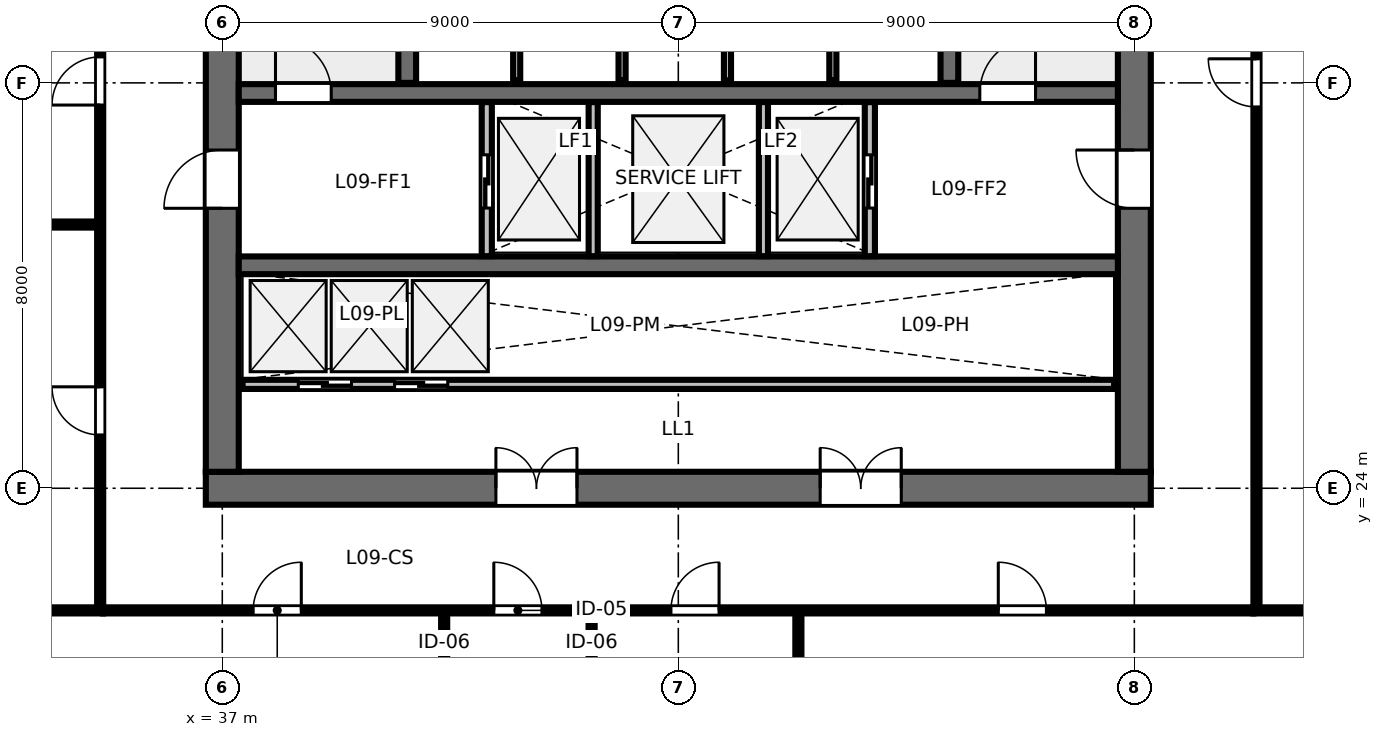
"""IFC4 building model, lengths in metres.
Left out: names, types, materials, properties, quantities, classifications, styles, units other than length and angle.
Written with IfcOpenShell. Run it as: python <this file> out.ifc"""

import sys

from ifc_helpers import new_model, si_unit, direction, frame, frame_2d, origin, place, context, subcontext, project, spatial, rectangle, extrude, element, fill, save


model = new_model("IFC4")
c1 = context("Model", 3, precision=1e-05, world=origin(), true_north=direction((0.0, 1.0)))
c2 = subcontext(c1, "Body", "Model", "MODEL_VIEW")
j1 = project(units=[si_unit("LENGTHUNIT", "METRE"), si_unit("PLANEANGLEUNIT", "RADIAN")], contexts=[c1])
p1 = place(None, origin())
s1 = spatial("IfcSite", under=j1, at=p1, CompositionType="ELEMENT")
p2 = place(p1, origin())
s2 = spatial("IfcBuilding", under=s1, at=p2, CompositionType="ELEMENT")
p3 = place(p2, frame((0.0, 0.0, 38.8)))
s3 = spatial("IfcBuildingStorey", under=s2, at=p3, CompositionType="ELEMENT", Elevation=38.8)
p4 = place(p3, frame((36.675, 24.0, 0.0), z_axis=(0.0, 0.0, 1.0), x_axis=(1.0, 0.0, 0.0)))
e1 = element("IfcWall", 1, at=p4, inside=s3, PredefinedType="SHEAR", context=c2, shape_type="SweptSolid", body=[
    extrude(rectangle(XDim=18.65, YDim=0.65, at=frame_2d((9.325, 0.0))), origin(), (0.0, 0.0, 1.0), 3.36),
])
p5 = place(p4, frame((5.725, 0.0, 0.0)))
e2 = element("IfcOpeningElement", 2, at=p5, cuts=e1, PredefinedType="OPENING", context=c2, shape_type="SweptSolid", body=[
    extrude(rectangle(XDim=1.6, YDim=2.15, at=frame_2d((0.8, 1.075))), frame((0.0, 0.335, 0.0), z_axis=(0.0, -1.0, 0.0), x_axis=(1.0, 0.0, 0.0)), (0.0, 0.0, 1.0), 0.67),
])
p6 = place(p4, frame((12.125, 0.0, 0.0)))
e3 = element("IfcOpeningElement", 3, at=p6, cuts=e1, PredefinedType="OPENING", context=c2, shape_type="SweptSolid", body=[
    extrude(rectangle(XDim=1.6, YDim=2.15, at=frame_2d((0.8, 1.075))), frame((0.0, 0.335, 0.0), z_axis=(0.0, -1.0, 0.0), x_axis=(1.0, 0.0, 0.0)), (0.0, 0.0, 1.0), 0.67),
])
p7 = place(p3, frame((37.0, 24.325, 0.0), z_axis=(0.0, 0.0, 1.0), x_axis=(0.0, 1.0, 0.0)))
e4 = element("IfcWall", 4, at=p7, inside=s3, PredefinedType="SHEAR", context=c2, shape_type="SweptSolid", body=[
    extrude(rectangle(XDim=15.35, YDim=0.65, at=frame_2d((7.675, 0.0))), origin(), (0.0, 0.0, 1.0), 3.36),
])
p8 = place(p7, frame((5.2, 0.0, 0.0)))
e5 = element("IfcOpeningElement", 5, at=p8, cuts=e4, PredefinedType="OPENING", context=c2, shape_type="SweptSolid", body=[
    extrude(rectangle(XDim=1.15, YDim=2.15, at=frame_2d((0.575, 1.075))), frame((0.0, 0.335, 0.0), z_axis=(0.0, -1.0, 0.0), x_axis=(1.0, 0.0, 0.0)), (0.0, 0.0, 1.0), 0.67),
])
p9 = place(p3, frame((55.0, 24.325, 0.0), z_axis=(0.0, 0.0, 1.0), x_axis=(0.0, 1.0, 0.0)))
e6 = element("IfcWall", 6, at=p9, inside=s3, PredefinedType="SHEAR", context=c2, shape_type="SweptSolid", body=[
    extrude(rectangle(XDim=15.35, YDim=0.65, at=frame_2d((7.675, 0.0))), origin(), (0.0, 0.0, 1.0), 3.36),
])
p10 = place(p9, frame((5.2, 0.0, 0.0)))
e7 = element("IfcOpeningElement", 7, at=p10, cuts=e6, PredefinedType="OPENING", context=c2, shape_type="SweptSolid", body=[
    extrude(rectangle(XDim=1.15, YDim=2.15, at=frame_2d((0.575, 1.075))), frame((0.0, 0.335, 0.0), z_axis=(0.0, -1.0, 0.0), x_axis=(1.0, 0.0, 0.0)), (0.0, 0.0, 1.0), 0.67),
])
p11 = place(p3, frame((37.325, 31.8, 0.0), z_axis=(0.0, 0.0, 1.0), x_axis=(1.0, 0.0, 0.0)))
e8 = element("IfcWall", 8, at=p11, inside=s3, PredefinedType="SHEAR", context=c2, shape_type="SweptSolid", body=[
    extrude(rectangle(XDim=17.35, YDim=0.35, at=frame_2d((8.675, 0.0))), origin(), (0.0, 0.0, 1.0), 3.36),
])
p12 = place(p11, frame((0.725, 0.0, 0.0)))
e9 = element("IfcOpeningElement", 9, at=p12, cuts=e8, PredefinedType="OPENING", context=c2, shape_type="SweptSolid", body=[
    extrude(rectangle(XDim=1.1, YDim=2.15, at=frame_2d((0.55, 1.075))), frame((0.0, 0.185, 0.0), z_axis=(0.0, -1.0, 0.0), x_axis=(1.0, 0.0, 0.0)), (0.0, 0.0, 1.0), 0.37),
])
p13 = place(p11, frame((14.625, 0.0, 0.0)))
e10 = element("IfcOpeningElement", 10, at=p13, cuts=e8, PredefinedType="OPENING", context=c2, shape_type="SweptSolid", body=[
    extrude(rectangle(XDim=1.1, YDim=2.15, at=frame_2d((0.55, 1.075))), frame((0.0, 0.185, 0.0), z_axis=(0.0, -1.0, 0.0), x_axis=(1.0, 0.0, 0.0)), (0.0, 0.0, 1.0), 0.37),
])
p14 = place(p3, frame((37.325, 28.4, 0.0), z_axis=(0.0, 0.0, 1.0), x_axis=(1.0, 0.0, 0.0)))
e11 = element("IfcWall", 11, at=p14, inside=s3, PredefinedType="SHEAR", context=c2, shape_type="SweptSolid", body=[
    extrude(rectangle(XDim=17.35, YDim=0.35, at=frame_2d((8.675, 0.0))), origin(), (0.0, 0.0, 1.0), 3.36),
])
for number, where, z_axis, x_axis in (
    (12, (40.65, 32.0, 0.0), (0.0, 0.0, 1.0), (0.0, 1.0, 0.0)),
    (13, (51.35, 32.0, 0.0), (0.0, 0.0, 1.0), (0.0, 1.0, 0.0)),
):
    element("IfcWall", number, at=place(p3, frame(where, z_axis=z_axis, x_axis=x_axis)), inside=s3, PredefinedType="SHEAR", context=c2, shape_type="SweptSolid", body=[
        extrude(rectangle(XDim=7.7, YDim=0.35, at=frame_2d((3.85, 0.0))), origin(), (0.0, 0.0, 1.0), 3.6),
    ])
for number, where, z_axis, x_axis in (
    (14, (42.81, 32.05, 0.0), (0.0, 0.0, 1.0), (0.0, 1.0, 0.0)),
    (15, (44.89, 32.05, 0.0), (0.0, 0.0, 1.0), (0.0, 1.0, 0.0)),
    (16, (46.97, 32.05, 0.0), (0.0, 0.0, 1.0), (0.0, 1.0, 0.0)),
    (17, (49.05, 32.05, 0.0), (0.0, 0.0, 1.0), (0.0, 1.0, 0.0)),
):
    element("IfcWall", number, at=place(p3, frame(where, z_axis=z_axis, x_axis=x_axis)), inside=s3, PredefinedType="PARTITIONING", context=c2, shape_type="SweptSolid", body=[
        extrude(rectangle(XDim=5.5, YDim=0.14, at=frame_2d((2.75, 0.0))), origin(), (0.0, 0.0, 1.0), 3.36),
    ])
p15 = place(p3, frame((42.22, 28.58, 0.0), z_axis=(0.0, 0.0, 1.0), x_axis=(0.0, 1.0, 0.0)))
e18 = element("IfcWall", 18, at=p15, inside=s3, PredefinedType="PARTITIONING", context=c2, shape_type="SweptSolid", body=[
    extrude(rectangle(XDim=3.04, YDim=0.2, at=frame_2d((1.52, 0.0))), origin(), (0.0, 0.0, 1.0), 3.36),
])
p16 = place(p15, frame((0.95, 0.0, 0.0)))
e19 = element("IfcOpeningElement", 19, at=p16, cuts=e18, PredefinedType="OPENING", context=c2, shape_type="SweptSolid", body=[
    extrude(rectangle(XDim=1.05, YDim=2.15, at=frame_2d((0.525, 1.075))), frame((0.0, 0.11, 0.0), z_axis=(0.0, -1.0, 0.0), x_axis=(1.0, 0.0, 0.0)), (0.0, 0.0, 1.0), 0.22),
])
p17 = place(p3, frame((49.78, 28.58, 0.0), z_axis=(0.0, 0.0, 1.0), x_axis=(0.0, 1.0, 0.0)))
e20 = element("IfcWall", 20, at=p17, inside=s3, PredefinedType="PARTITIONING", context=c2, shape_type="SweptSolid", body=[
    extrude(rectangle(XDim=3.04, YDim=0.2, at=frame_2d((1.52, 0.0))), origin(), (0.0, 0.0, 1.0), 3.36),
])
p18 = place(p17, frame((0.95, 0.0, 0.0)))
e21 = element("IfcOpeningElement", 21, at=p18, cuts=e20, PredefinedType="OPENING", context=c2, shape_type="SweptSolid", body=[
    extrude(rectangle(XDim=1.05, YDim=2.15, at=frame_2d((0.525, 1.075))), frame((0.0, 0.11, 0.0), z_axis=(0.0, -1.0, 0.0), x_axis=(1.0, 0.0, 0.0)), (0.0, 0.0, 1.0), 0.22),
])
for number, where, z_axis, x_axis in (
    (22, (44.32, 28.58, 0.0), (0.0, 0.0, 1.0), (0.0, 1.0, 0.0)),
    (23, (47.68, 28.58, 0.0), (0.0, 0.0, 1.0), (0.0, 1.0, 0.0)),
):
    element("IfcWall", number, at=place(p3, frame(where, z_axis=z_axis, x_axis=x_axis)), inside=s3, PredefinedType="PARTITIONING", context=c2, shape_type="SweptSolid", body=[
        extrude(rectangle(XDim=3.04, YDim=0.18, at=frame_2d((1.52, 0.0))), origin(), (0.0, 0.0, 1.0), 3.36),
    ])
p19 = place(p3, frame((37.4, 26.05, 0.0), z_axis=(0.0, 0.0, 1.0), x_axis=(1.0, 0.0, 0.0)))
e24 = element("IfcWall", 24, at=p19, inside=s3, PredefinedType="PARTITIONING", context=c2, shape_type="SweptSolid", body=[
    extrude(rectangle(XDim=17.2, YDim=0.18, at=frame_2d((8.6, 0.0))), origin(), (0.0, 0.0, 1.0), 3.36),
])
p20 = place(p19, frame((1.1, 0.0, 0.0)))
e25 = element("IfcOpeningElement", 25, at=p20, cuts=e24, PredefinedType="OPENING", context=c2, shape_type="SweptSolid", body=[
    extrude(rectangle(XDim=1.05, YDim=2.15, at=frame_2d((0.525, 1.075))), frame((0.0, 0.1, 0.0), z_axis=(0.0, -1.0, 0.0), x_axis=(1.0, 0.0, 0.0)), (0.0, 0.0, 1.0), 0.2),
])
p21 = place(p19, frame((3.0, 0.0, 0.0)))
e26 = element("IfcOpeningElement", 26, at=p21, cuts=e24, PredefinedType="OPENING", context=c2, shape_type="SweptSolid", body=[
    extrude(rectangle(XDim=1.05, YDim=2.15, at=frame_2d((0.525, 1.075))), frame((0.0, 0.1, 0.0), z_axis=(0.0, -1.0, 0.0), x_axis=(1.0, 0.0, 0.0)), (0.0, 0.0, 1.0), 0.2),
])
p22 = place(p3, frame((41.379, 21.59, 0.0), z_axis=(0.0, 0.0, 1.0), x_axis=(0.0, -1.0, 0.0)))
e27 = element("IfcWall", 27, at=p22, inside=s3, PredefinedType="PARTITIONING", context=c2, shape_type="SweptSolid", body=[
    extrude(rectangle(XDim=10.51, YDim=0.12, at=frame_2d((5.255, 0.0))), origin(), (0.0, 0.0, 1.0), 2.64),
])
p23 = place(p22, frame((1.4, 0.0, 0.0)))
e28 = element("IfcOpeningElement", 28, at=p23, cuts=e27, PredefinedType="OPENING", context=c2, shape_type="SweptSolid", body=[
    extrude(rectangle(XDim=0.9, YDim=2.15, at=frame_2d((0.45, 1.075))), frame((0.0, 0.07, 0.0), z_axis=(0.0, -1.0, 0.0), x_axis=(1.0, 0.0, 0.0)), (0.0, 0.0, 1.0), 0.14),
])
p24 = place(p3, frame((44.289, 21.59, 0.0), z_axis=(0.0, 0.0, 1.0), x_axis=(0.0, -1.0, 0.0)))
e29 = element("IfcWall", 29, at=p24, inside=s3, PredefinedType="PARTITIONING", context=c2, shape_type="SweptSolid", body=[
    extrude(rectangle(XDim=10.51, YDim=0.12, at=frame_2d((5.255, 0.0))), origin(), (0.0, 0.0, 1.0), 2.64),
])
p25 = place(p24, frame((1.4, 0.0, 0.0)))
e30 = element("IfcOpeningElement", 30, at=p25, cuts=e29, PredefinedType="OPENING", context=c2, shape_type="SweptSolid", body=[
    extrude(rectangle(XDim=0.9, YDim=2.15, at=frame_2d((0.45, 1.075))), frame((0.0, 0.07, 0.0), z_axis=(0.0, -1.0, 0.0), x_axis=(1.0, 0.0, 0.0)), (0.0, 0.0, 1.0), 0.14),
])
p26 = place(p3, frame((48.37, 21.59, 0.0), z_axis=(0.0, 0.0, 1.0), x_axis=(0.0, -1.0, 0.0)))
e31 = element("IfcWall", 31, at=p26, inside=s3, PredefinedType="PARTITIONING", context=c2, shape_type="SweptSolid", body=[
    extrude(rectangle(XDim=10.51, YDim=0.12, at=frame_2d((5.255, 0.0))), origin(), (0.0, 0.0, 1.0), 2.64),
])
p27 = place(p26, frame((1.4, 0.0, 0.0)))
e32 = element("IfcOpeningElement", 32, at=p27, cuts=e31, PredefinedType="OPENING", context=c2, shape_type="SweptSolid", body=[
    extrude(rectangle(XDim=0.9, YDim=2.15, at=frame_2d((0.45, 1.075))), frame((0.0, 0.07, 0.0), z_axis=(0.0, -1.0, 0.0), x_axis=(1.0, 0.0, 0.0)), (0.0, 0.0, 1.0), 0.14),
])
p28 = place(p3, frame((34.65, 21.59, 0.0), z_axis=(0.0, 0.0, 1.0), x_axis=(1.0, 0.0, 0.0)))
e33 = element("IfcWall", 33, at=p28, inside=s3, PredefinedType="PARTITIONING", context=c2, shape_type="SweptSolid", body=[
    extrude(rectangle(XDim=22.7, YDim=0.12, at=frame_2d((11.35, 0.0))), origin(), (0.0, 0.0, 1.0), 2.64),
])
p29 = place(p28, frame((2.959, 0.0, 0.0)))
e34 = element("IfcOpeningElement", 34, at=p29, cuts=e33, PredefinedType="OPENING", context=c2, shape_type="SweptSolid", body=[
    extrude(rectangle(XDim=0.95, YDim=2.15, at=frame_2d((0.475, 1.075))), frame((0.0, 0.07, 0.0), z_axis=(0.0, -1.0, 0.0), x_axis=(1.0, 0.0, 0.0)), (0.0, 0.0, 1.0), 0.14),
])
p30 = place(p28, frame((7.709, 0.0, 0.0)))
e35 = element("IfcOpeningElement", 35, at=p30, cuts=e33, PredefinedType="OPENING", context=c2, shape_type="SweptSolid", body=[
    extrude(rectangle(XDim=0.95, YDim=2.15, at=frame_2d((0.475, 1.075))), frame((0.0, 0.07, 0.0), z_axis=(0.0, -1.0, 0.0), x_axis=(1.0, 0.0, 0.0)), (0.0, 0.0, 1.0), 0.14),
])
p31 = place(p28, frame((11.204, 0.0, 0.0)))
e36 = element("IfcOpeningElement", 36, at=p31, cuts=e33, PredefinedType="OPENING", context=c2, shape_type="SweptSolid", body=[
    extrude(rectangle(XDim=0.95, YDim=2.15, at=frame_2d((0.475, 1.075))), frame((0.0, 0.07, 0.0), z_axis=(0.0, -1.0, 0.0), x_axis=(1.0, 0.0, 0.0)), (0.0, 0.0, 1.0), 0.14),
])
p32 = place(p28, frame((17.665, 0.0, 0.0)))
e37 = element("IfcOpeningElement", 37, at=p32, cuts=e33, PredefinedType="OPENING", context=c2, shape_type="SweptSolid", body=[
    extrude(rectangle(XDim=0.95, YDim=2.15, at=frame_2d((0.475, 1.075))), frame((0.0, 0.07, 0.0), z_axis=(0.0, -1.0, 0.0), x_axis=(1.0, 0.0, 0.0)), (0.0, 0.0, 1.0), 0.14),
])
p33 = place(p3, frame((34.59, 29.204, 0.0), z_axis=(0.0, 0.0, 1.0), x_axis=(-1.0, 0.0, 0.0)))
e38 = element("IfcWall", 38, at=p33, inside=s3, PredefinedType="PARTITIONING", context=c2, shape_type="SweptSolid", body=[
    extrude(rectangle(XDim=12.36, YDim=0.12, at=frame_2d((6.18, 0.0))), origin(), (0.0, 0.0, 1.0), 2.64),
])
p34 = place(p33, frame((1.4, 0.0, 0.0)))
e39 = element("IfcOpeningElement", 39, at=p34, cuts=e38, PredefinedType="OPENING", context=c2, shape_type="SweptSolid", body=[
    extrude(rectangle(XDim=0.9, YDim=2.15, at=frame_2d((0.45, 1.075))), frame((0.0, 0.07, 0.0), z_axis=(0.0, -1.0, 0.0), x_axis=(1.0, 0.0, 0.0)), (0.0, 0.0, 1.0), 0.14),
])
p35 = place(p3, frame((34.59, 21.65, 0.0), z_axis=(0.0, 0.0, 1.0), x_axis=(0.0, 1.0, 0.0)))
e40 = element("IfcWall", 40, at=p35, inside=s3, PredefinedType="PARTITIONING", context=c2, shape_type="SweptSolid", body=[
    extrude(rectangle(XDim=20.7, YDim=0.12, at=frame_2d((10.35, 0.0))), origin(), (0.0, 0.0, 1.0), 2.64),
])
p36 = place(p35, frame((3.402, 0.0, 0.0)))
e41 = element("IfcOpeningElement", 41, at=p36, cuts=e40, PredefinedType="OPENING", context=c2, shape_type="SweptSolid", body=[
    extrude(rectangle(XDim=0.95, YDim=2.15, at=frame_2d((0.475, 1.075))), frame((0.0, 0.07, 0.0), z_axis=(0.0, -1.0, 0.0), x_axis=(1.0, 0.0, 0.0)), (0.0, 0.0, 1.0), 0.14),
])
p37 = place(p35, frame((9.912, 0.0, 0.0)))
e42 = element("IfcOpeningElement", 42, at=p37, cuts=e40, PredefinedType="OPENING", context=c2, shape_type="SweptSolid", body=[
    extrude(rectangle(XDim=0.95, YDim=2.15, at=frame_2d((0.475, 1.075))), frame((0.0, 0.07, 0.0), z_axis=(0.0, -1.0, 0.0), x_axis=(1.0, 0.0, 0.0)), (0.0, 0.0, 1.0), 0.14),
])
p38 = place(p35, frame((16.385, 0.0, 0.0)))
e43 = element("IfcOpeningElement", 43, at=p38, cuts=e40, PredefinedType="OPENING", context=c2, shape_type="SweptSolid", body=[
    extrude(rectangle(XDim=0.95, YDim=2.15, at=frame_2d((0.475, 1.075))), frame((0.0, 0.07, 0.0), z_axis=(0.0, -1.0, 0.0), x_axis=(1.0, 0.0, 0.0)), (0.0, 0.0, 1.0), 0.14),
])
p39 = place(p3, frame((57.41, 21.65, 0.0), z_axis=(0.0, 0.0, 1.0), x_axis=(0.0, 1.0, 0.0)))
e44 = element("IfcWall", 44, at=p39, inside=s3, PredefinedType="PARTITIONING", context=c2, shape_type="SweptSolid", body=[
    extrude(rectangle(XDim=20.7, YDim=0.12, at=frame_2d((10.35, 0.0))), origin(), (0.0, 0.0, 1.0), 2.64),
])
p40 = place(p39, frame((9.875, 0.0, 0.0)))
e45 = element("IfcOpeningElement", 45, at=p40, cuts=e44, PredefinedType="OPENING", context=c2, shape_type="SweptSolid", body=[
    extrude(rectangle(XDim=0.95, YDim=2.15, at=frame_2d((0.475, 1.075))), frame((0.0, 0.07, 0.0), z_axis=(0.0, -1.0, 0.0), x_axis=(1.0, 0.0, 0.0)), (0.0, 0.0, 1.0), 0.14),
])
for number, where, z_axis, x_axis in (
    (46, (34.65, 21.59, 0.0), (0.0, 0.0, 1.0), (-1.0, 0.0, 0.0)),
    (47, (57.35, 21.59, 0.0), (0.0, 0.0, 1.0), (1.0, 0.0, 0.0)),
):
    element("IfcWall", number, at=place(p3, frame(where, z_axis=z_axis, x_axis=x_axis)), inside=s3, PredefinedType="PARTITIONING", context=c2, shape_type="SweptSolid", body=[
        extrude(rectangle(XDim=12.42, YDim=0.12, at=frame_2d((6.21, 0.0))), origin(), (0.0, 0.0, 1.0), 2.64),
    ])
p41 = place(p12, origin())
e48 = element("IfcDoor", 48, at=p41, inside=s3, OperationType="SINGLE_SWING_LEFT", PredefinedType="DOOR", context=c2, shape_type="SweptSolid", body=[
    extrude(rectangle(XDim=1.1, YDim=2.15, at=frame_2d((0.55, 1.075))), frame((0.0, 0.025, 0.0), z_axis=(0.0, -1.0, 0.0), x_axis=(1.0, 0.0, 0.0)), (0.0, 0.0, 1.0), 0.05),
])
fill(e9, e48)
p42 = place(p13, origin())
e49 = element("IfcDoor", 49, at=p42, inside=s3, OperationType="SINGLE_SWING_RIGHT", PredefinedType="DOOR", context=c2, shape_type="SweptSolid", body=[
    extrude(rectangle(XDim=1.1, YDim=2.15, at=frame_2d((0.55, 1.075))), frame((0.0, 0.025, 0.0), z_axis=(0.0, -1.0, 0.0), x_axis=(1.0, 0.0, 0.0)), (0.0, 0.0, 1.0), 0.05),
])
fill(e10, e49)
p43 = place(p8, origin())
e50 = element("IfcDoor", 50, at=p43, inside=s3, OperationType="SINGLE_SWING_LEFT", PredefinedType="DOOR", context=c2, shape_type="SweptSolid", body=[
    extrude(rectangle(XDim=1.15, YDim=2.15, at=frame_2d((0.575, 1.075))), frame((0.0, 0.025, 0.0), z_axis=(0.0, -1.0, 0.0), x_axis=(1.0, 0.0, 0.0)), (0.0, 0.0, 1.0), 0.05),
])
fill(e5, e50)
p44 = place(p10, origin())
e51 = element("IfcDoor", 51, at=p44, inside=s3, OperationType="SINGLE_SWING_RIGHT", PredefinedType="DOOR", context=c2, shape_type="SweptSolid", body=[
    extrude(rectangle(XDim=1.15, YDim=2.15, at=frame_2d((0.575, 1.075))), frame((0.0, 0.025, 0.0), z_axis=(0.0, -1.0, 0.0), x_axis=(1.0, 0.0, 0.0)), (0.0, 0.0, 1.0), 0.05),
])
fill(e7, e51)
p45 = place(p5, origin())
e52 = element("IfcDoor", 52, at=p45, inside=s3, OperationType="DOUBLE_DOOR_SINGLE_SWING", PredefinedType="DOOR", context=c2, shape_type="SweptSolid", body=[
    extrude(rectangle(XDim=1.6, YDim=2.15, at=frame_2d((0.8, 1.075))), frame((0.0, 0.025, 0.0), z_axis=(0.0, -1.0, 0.0), x_axis=(1.0, 0.0, 0.0)), (0.0, 0.0, 1.0), 0.05),
])
fill(e2, e52)
p46 = place(p6, origin())
e53 = element("IfcDoor", 53, at=p46, inside=s3, OperationType="DOUBLE_DOOR_SINGLE_SWING", PredefinedType="DOOR", context=c2, shape_type="SweptSolid", body=[
    extrude(rectangle(XDim=1.6, YDim=2.15, at=frame_2d((0.8, 1.075))), frame((0.0, 0.025, 0.0), z_axis=(0.0, -1.0, 0.0), x_axis=(1.0, 0.0, 0.0)), (0.0, 0.0, 1.0), 0.05),
])
fill(e3, e53)
p47 = place(p16, origin())
e54 = element("IfcDoor", 54, at=p47, inside=s3, OperationType="SLIDING_TO_LEFT", PredefinedType="DOOR", context=c2, shape_type="SweptSolid", body=[
    extrude(rectangle(XDim=1.05, YDim=2.15, at=frame_2d((0.525, 1.075))), frame((0.0, 0.025, 0.0), z_axis=(0.0, -1.0, 0.0), x_axis=(1.0, 0.0, 0.0)), (0.0, 0.0, 1.0), 0.05),
])
fill(e19, e54)
p48 = place(p18, origin())
e55 = element("IfcDoor", 55, at=p48, inside=s3, OperationType="SLIDING_TO_RIGHT", PredefinedType="DOOR", context=c2, shape_type="SweptSolid", body=[
    extrude(rectangle(XDim=1.05, YDim=2.15, at=frame_2d((0.525, 1.075))), frame((0.0, 0.025, 0.0), z_axis=(0.0, -1.0, 0.0), x_axis=(1.0, 0.0, 0.0)), (0.0, 0.0, 1.0), 0.05),
])
fill(e21, e55)
p49 = place(p20, origin())
e56 = element("IfcDoor", 56, at=p49, inside=s3, OperationType="SLIDING_TO_LEFT", PredefinedType="DOOR", context=c2, shape_type="SweptSolid", body=[
    extrude(rectangle(XDim=1.05, YDim=2.15, at=frame_2d((0.525, 1.075))), frame((0.0, 0.025, 0.0), z_axis=(0.0, -1.0, 0.0), x_axis=(1.0, 0.0, 0.0)), (0.0, 0.0, 1.0), 0.05),
])
fill(e25, e56)
p50 = place(p21, origin())
e57 = element("IfcDoor", 57, at=p50, inside=s3, OperationType="SLIDING_TO_RIGHT", PredefinedType="DOOR", context=c2, shape_type="SweptSolid", body=[
    extrude(rectangle(XDim=1.05, YDim=2.15, at=frame_2d((0.525, 1.075))), frame((0.0, 0.025, 0.0), z_axis=(0.0, -1.0, 0.0), x_axis=(1.0, 0.0, 0.0)), (0.0, 0.0, 1.0), 0.05),
])
fill(e26, e57)
p51 = place(p29, origin())
e58 = element("IfcDoor", 58, at=p51, inside=s3, OperationType="SINGLE_SWING_RIGHT", PredefinedType="DOOR", context=c2, shape_type="SweptSolid", body=[
    extrude(rectangle(XDim=0.95, YDim=2.15, at=frame_2d((0.475, 1.075))), frame((0.0, 0.025, 0.0), z_axis=(0.0, -1.0, 0.0), x_axis=(1.0, 0.0, 0.0)), (0.0, 0.0, 1.0), 0.05),
])
fill(e34, e58)
p52 = place(p30, origin())
e59 = element("IfcDoor", 59, at=p52, inside=s3, OperationType="SINGLE_SWING_LEFT", PredefinedType="DOOR", context=c2, shape_type="SweptSolid", body=[
    extrude(rectangle(XDim=0.95, YDim=2.15, at=frame_2d((0.475, 1.075))), frame((0.0, 0.025, 0.0), z_axis=(0.0, -1.0, 0.0), x_axis=(1.0, 0.0, 0.0)), (0.0, 0.0, 1.0), 0.05),
])
fill(e35, e59)
p53 = place(p31, origin())
e60 = element("IfcDoor", 60, at=p53, inside=s3, OperationType="SINGLE_SWING_RIGHT", PredefinedType="DOOR", context=c2, shape_type="SweptSolid", body=[
    extrude(rectangle(XDim=0.95, YDim=2.15, at=frame_2d((0.475, 1.075))), frame((0.0, 0.025, 0.0), z_axis=(0.0, -1.0, 0.0), x_axis=(1.0, 0.0, 0.0)), (0.0, 0.0, 1.0), 0.05),
])
fill(e36, e60)
p54 = place(p32, origin())
e61 = element("IfcDoor", 61, at=p54, inside=s3, OperationType="SINGLE_SWING_LEFT", PredefinedType="DOOR", context=c2, shape_type="SweptSolid", body=[
    extrude(rectangle(XDim=0.95, YDim=2.15, at=frame_2d((0.475, 1.075))), frame((0.0, 0.025, 0.0), z_axis=(0.0, -1.0, 0.0), x_axis=(1.0, 0.0, 0.0)), (0.0, 0.0, 1.0), 0.05),
])
fill(e37, e61)
p55 = place(p36, origin())
e62 = element("IfcDoor", 62, at=p55, inside=s3, OperationType="SINGLE_SWING_RIGHT", PredefinedType="DOOR", context=c2, shape_type="SweptSolid", body=[
    extrude(rectangle(XDim=0.95, YDim=2.15, at=frame_2d((0.475, 1.075))), frame((0.0, 0.025, 0.0), z_axis=(0.0, -1.0, 0.0), x_axis=(1.0, 0.0, 0.0)), (0.0, 0.0, 1.0), 0.05),
])
fill(e41, e62)
p56 = place(p37, origin())
e63 = element("IfcDoor", 63, at=p56, inside=s3, OperationType="SINGLE_SWING_LEFT", PredefinedType="DOOR", context=c2, shape_type="SweptSolid", body=[
    extrude(rectangle(XDim=0.95, YDim=2.15, at=frame_2d((0.475, 1.075))), frame((0.0, 0.025, 0.0), z_axis=(0.0, -1.0, 0.0), x_axis=(1.0, 0.0, 0.0)), (0.0, 0.0, 1.0), 0.05),
])
fill(e42, e63)
p57 = place(p40, origin())
e64 = element("IfcDoor", 64, at=p57, inside=s3, OperationType="SINGLE_SWING_RIGHT", PredefinedType="DOOR", context=c2, shape_type="SweptSolid", body=[
    extrude(rectangle(XDim=0.95, YDim=2.15, at=frame_2d((0.475, 1.075))), frame((0.0, 0.025, 0.0), z_axis=(0.0, -1.0, 0.0), x_axis=(1.0, 0.0, 0.0)), (0.0, 0.0, 1.0), 0.05),
])
fill(e45, e64)
save(model, sys.argv[1])
